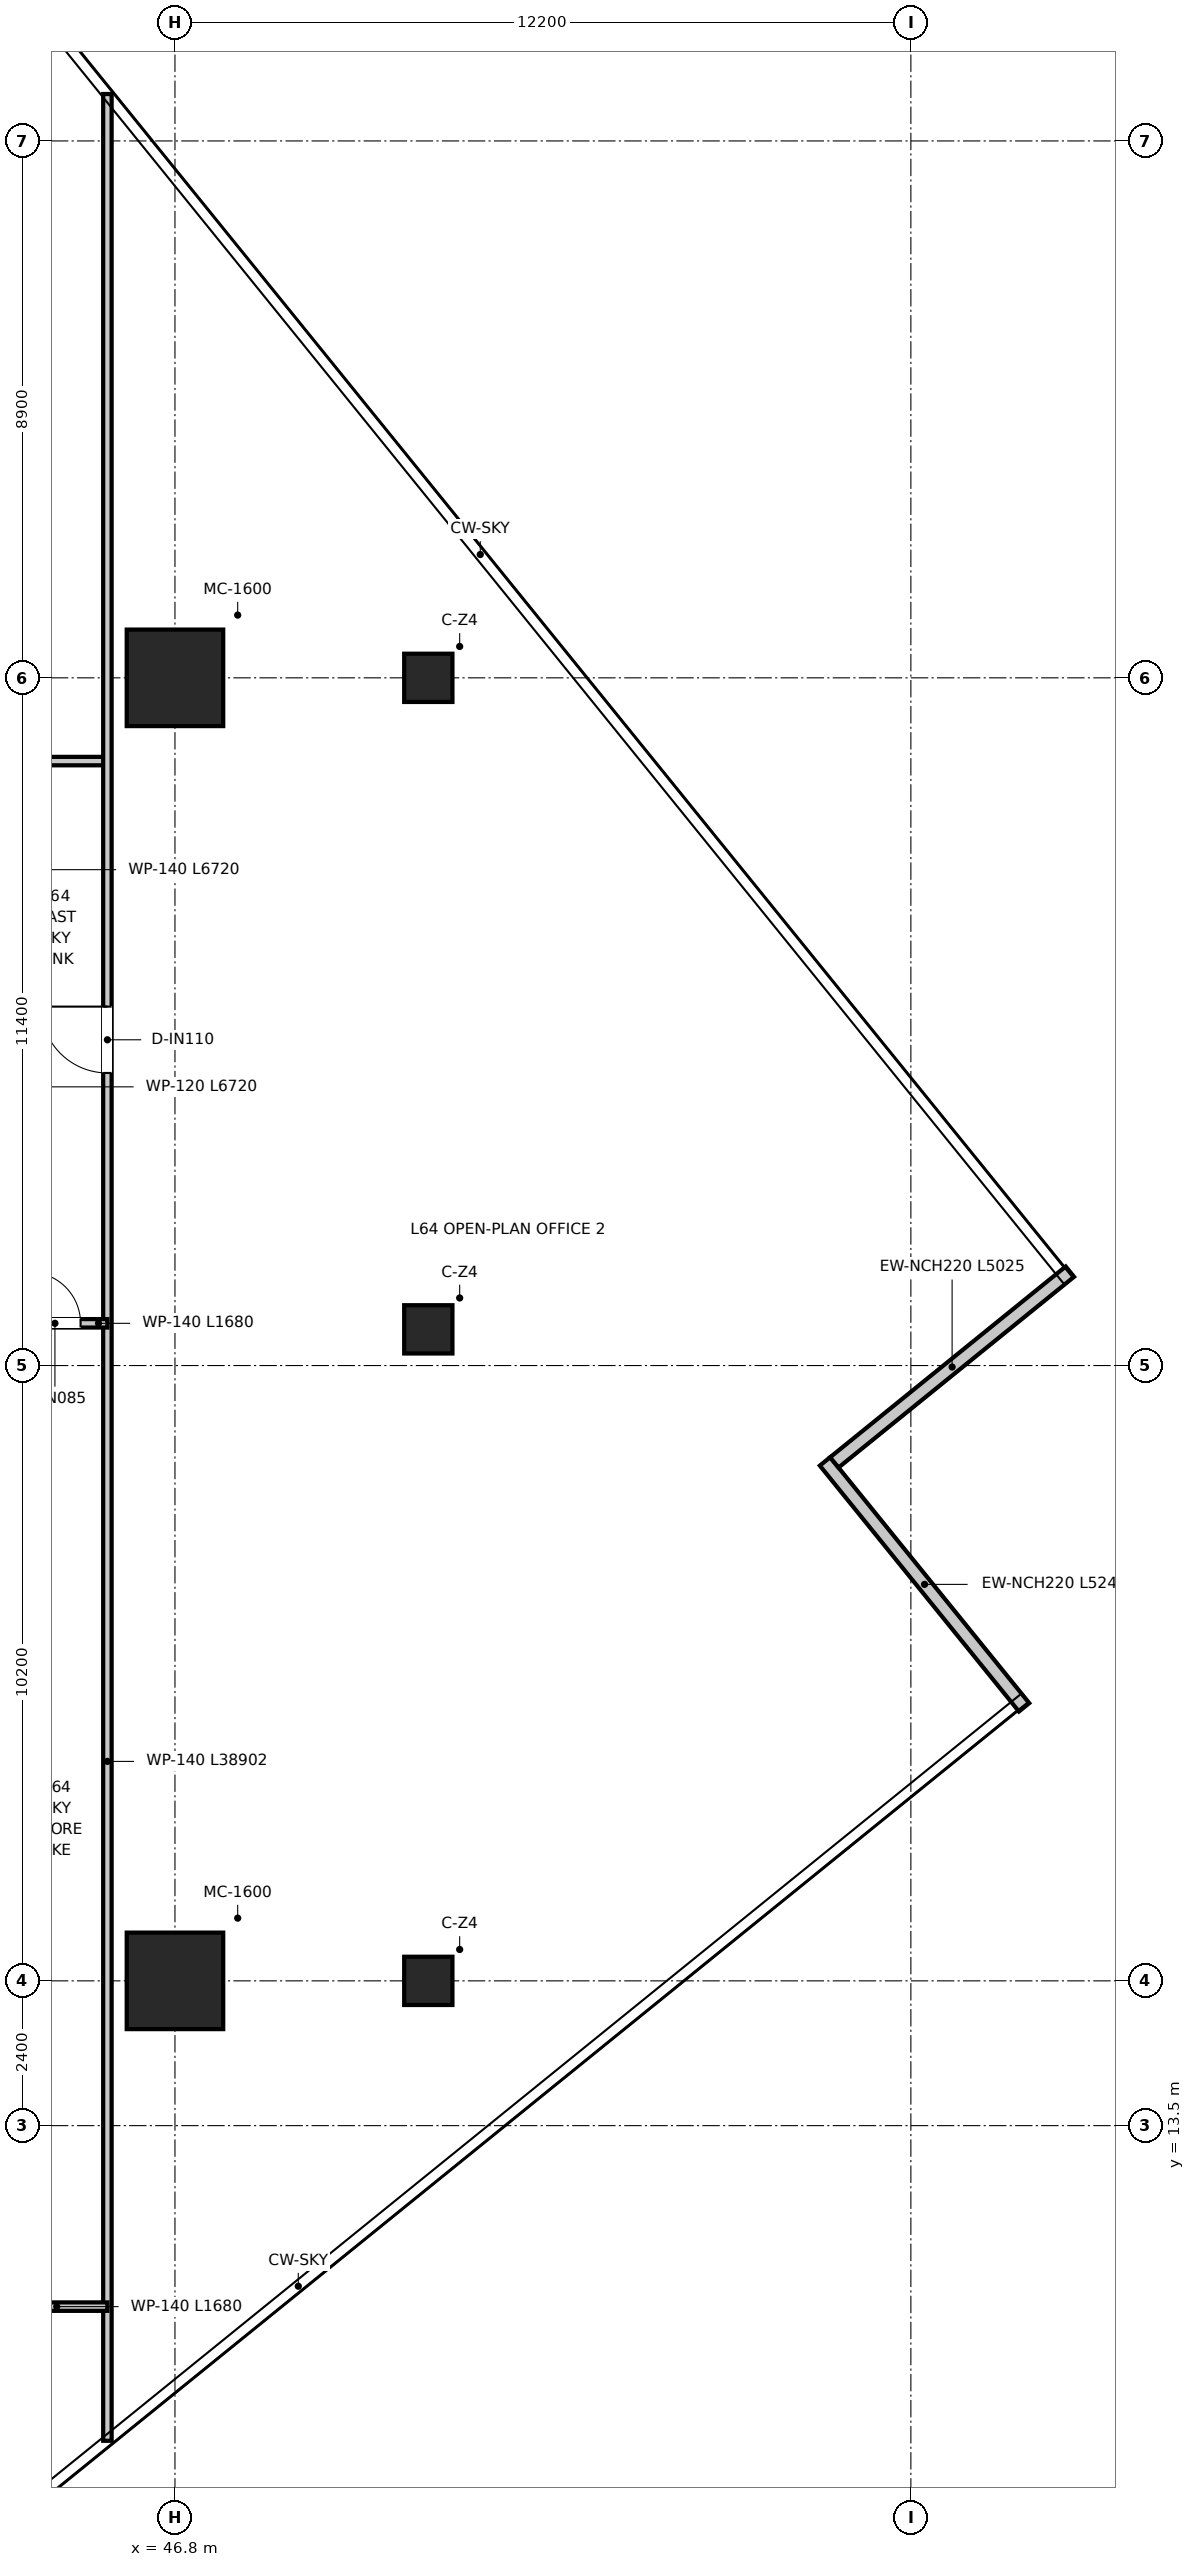
"""IFC4 building model, lengths in metres.
Left out: names, types, materials, properties, quantities, classifications, styles, units other than length and angle.
Written with IfcOpenShell. Run it as: python <this file> out.ifc"""

import sys

from ifc_helpers import new_model, si_unit, direction, frame, frame_2d, origin, origin_2d, place, context, subcontext, project, spatial, rectangle, extrude, source, transform, mapped, element, fill, save


model = new_model("IFC4")
c1 = context("Model", 3, precision=1e-05, world=origin(), true_north=direction((0.0, 1.0)))
c2 = subcontext(c1, "Body", "Model", "MODEL_VIEW")
j1 = project(units=[si_unit("LENGTHUNIT", "METRE"), si_unit("PLANEANGLEUNIT", "RADIAN")], contexts=[c1])
p1 = place(None, origin())
s1 = spatial("IfcSite", under=j1, at=p1, CompositionType="ELEMENT")
p2 = place(p1, origin())
s2 = spatial("IfcBuilding", under=s1, at=p2, CompositionType="ELEMENT")
p3 = place(p2, frame((0.0, 0.0, 262.6)))
s3 = spatial("IfcBuildingStorey", under=s2, at=p3, CompositionType="ELEMENT", Elevation=262.6)
m1 = source(origin(), c2, "Body", "SweptSolid", [
    extrude(rectangle(XDim=1.6, YDim=1.6, at=origin_2d()), origin(), (0.0, 0.0, 1.0), 4.8),
])
for number, where, z_axis, x_axis in (
    (1, (46.8, 15.9, 0.0), (0.0, 0.0, 1.0), (1.0, 0.0, 0.0)),
    (2, (46.8, 37.5, 0.0), (0.0, 0.0, 1.0), (1.0, 0.0, 0.0)),
):
    element("IfcColumn", number, at=place(p3, frame(where, z_axis=z_axis, x_axis=x_axis)), inside=s3, PredefinedType="USERDEFINED", context=c2, shape_type="MappedRepresentation", body=[
        mapped(m1, transform((0.0, 0.0, 0.0), x_axis=(1.0, 0.0, 0.0), y_axis=(0.0, 1.0, 0.0), z_axis=(0.0, 0.0, 1.0), scale=1.0)),
    ])
m2 = source(origin(), c2, "Body", "SweptSolid", [
    extrude(rectangle(XDim=0.8, YDim=0.8, at=origin_2d()), origin(), (0.0, 0.0, 1.0), 4.8),
])
for number, where, z_axis, x_axis in (
    (3, (51.0, 37.5, 0.0), (0.0, 0.0, 1.0), (1.0, 0.0, 0.0)),
    (4, (51.0, 26.7, 0.0), (0.0, 0.0, 1.0), (1.0, 0.0, 0.0)),
    (5, (51.0, 15.9, 0.0), (0.0, 0.0, 1.0), (1.0, 0.0, 0.0)),
):
    element("IfcColumn", number, at=place(p3, frame(where, z_axis=z_axis, x_axis=x_axis)), inside=s3, PredefinedType="COLUMN", context=c2, shape_type="MappedRepresentation", body=[
        mapped(m2, transform((0.0, 0.0, 0.0), x_axis=(1.0, 0.0, 0.0), y_axis=(0.0, 1.0, 0.0), z_axis=(0.0, 0.0, 1.0), scale=1.0)),
    ])
p4 = place(p3, frame((60.877, 20.434, 0.0), z_axis=(0.0, 0.0, 1.0), x_axis=(-0.629344166981, 0.777126707485, 0.0)))
e6 = element("IfcWall", 6, at=p4, inside=s3, PredefinedType="ELEMENTEDWALL", context=c2, shape_type="SweptSolid", body=[
    extrude(rectangle(XDim=5.245, YDim=0.22, at=frame_2d((2.623, 0.0))), origin(), (0.0, 0.0, 1.0), 4.52),
])
p5 = place(p3, frame((57.731, 24.494, 0.0), z_axis=(0.0, 0.0, 1.0), x_axis=(0.777153217978, 0.629311429887, 0.0)))
e7 = element("IfcWall", 7, at=p5, inside=s3, PredefinedType="ELEMENTEDWALL", context=c2, shape_type="SweptSolid", body=[
    extrude(rectangle(XDim=5.025, YDim=0.22, at=frame_2d((2.513, 0.0))), origin(), (0.0, 0.0, 1.0), 4.52),
])
p6 = place(p3, frame((26.32, 36.12, 0.0), z_axis=(0.0, 0.0, 1.0), x_axis=(1.0, 0.0, 0.0)))
e8 = element("IfcWall", 8, at=p6, inside=s3, PredefinedType="PARTITIONING", context=c2, shape_type="SweptSolid", body=[
    extrude(rectangle(XDim=19.36, YDim=0.14, at=frame_2d((9.68, 0.0))), origin(), (0.0, 0.0, 1.0), 4.03),
])
p7 = place(p6, frame((2.49, 0.0, 0.0)))
e9 = element("IfcOpeningElement", 9, at=p7, cuts=e8, PredefinedType="OPENING", context=c2, shape_type="SweptSolid", body=[
    extrude(rectangle(XDim=1.2, YDim=2.15, at=frame_2d((0.6, 1.075))), frame((0.0, 0.08, 0.0), z_axis=(0.0, -1.0, 0.0), x_axis=(1.0, 0.0, 0.0)), (0.0, 0.0, 1.0), 0.16),
])
p8 = place(p6, frame((9.08, 0.0, 0.0)))
e10 = element("IfcOpeningElement", 10, at=p8, cuts=e8, PredefinedType="OPENING", context=c2, shape_type="SweptSolid", body=[
    extrude(rectangle(XDim=1.2, YDim=2.15, at=frame_2d((0.6, 1.075))), frame((0.0, 0.08, 0.0), z_axis=(0.0, -1.0, 0.0), x_axis=(1.0, 0.0, 0.0)), (0.0, 0.0, 1.0), 0.16),
])
p9 = place(p6, frame((15.67, 0.0, 0.0)))
e11 = element("IfcOpeningElement", 11, at=p9, cuts=e8, PredefinedType="OPENING", context=c2, shape_type="SweptSolid", body=[
    extrude(rectangle(XDim=1.2, YDim=2.15, at=frame_2d((0.6, 1.075))), frame((0.0, 0.08, 0.0), z_axis=(0.0, -1.0, 0.0), x_axis=(1.0, 0.0, 0.0)), (0.0, 0.0, 1.0), 0.16),
])
p10 = place(p3, frame((45.68, 8.276, 0.0), z_axis=(0.0, 0.0, 1.0), x_axis=(0.0, 1.0, 0.0)))
e12 = element("IfcWall", 12, at=p10, inside=s3, PredefinedType="PARTITIONING", context=c2, shape_type="SweptSolid", body=[
    extrude(rectangle(XDim=38.902, YDim=0.14, at=frame_2d((19.451, 0.0))), origin(), (0.0, 0.0, 1.0), 3.88),
])
p11 = place(p10, frame((22.674, 0.0, 0.0)))
e13 = element("IfcOpeningElement", 13, at=p11, cuts=e12, PredefinedType="OPENING", context=c2, shape_type="SweptSolid", body=[
    extrude(rectangle(XDim=1.1, YDim=2.15, at=frame_2d((0.55, 1.075))), frame((0.0, 0.08, 0.0), z_axis=(0.0, -1.0, 0.0), x_axis=(1.0, 0.0, 0.0)), (0.0, 0.0, 1.0), 0.16),
])
p12 = place(p3, frame((44.0, 26.8, 0.0), z_axis=(0.0, 0.0, 1.0), x_axis=(1.0, 0.0, 0.0)))
e14 = element("IfcWall", 14, at=p12, inside=s3, PredefinedType="PARTITIONING", context=c2, shape_type="SweptSolid", body=[
    extrude(rectangle(XDim=1.68, YDim=0.14, at=frame_2d((0.84, 0.0))), origin(), (0.0, 0.0, 1.0), 4.03),
])
p13 = place(p12, frame((0.385, 0.0, 0.0)))
e15 = element("IfcOpeningElement", 15, at=p13, cuts=e14, PredefinedType="OPENING", context=c2, shape_type="SweptSolid", body=[
    extrude(rectangle(XDim=0.85, YDim=2.1, at=frame_2d((0.425, 1.05))), frame((0.0, 0.08, 0.0), z_axis=(0.0, -1.0, 0.0), x_axis=(1.0, 0.0, 0.0)), (0.0, 0.0, 1.0), 0.16),
])
p14 = place(p3, frame((44.0, 10.5, 0.0), z_axis=(0.0, 0.0, 1.0), x_axis=(1.0, 0.0, 0.0)))
e16 = element("IfcWall", 16, at=p14, inside=s3, PredefinedType="PARTITIONING", context=c2, shape_type="SweptSolid", body=[
    extrude(rectangle(XDim=1.68, YDim=0.14, at=frame_2d((0.84, 0.0))), origin(), (0.0, 0.0, 1.0), 4.52),
])
p15 = place(p11, origin())
e17 = element("IfcDoor", 17, at=p15, inside=s3, OperationType="SINGLE_SWING_RIGHT", PredefinedType="DOOR", context=c2, shape_type="SweptSolid", body=[
    extrude(rectangle(XDim=1.1, YDim=2.15, at=frame_2d((0.55, 1.075))), frame((0.0, 0.025, 0.0), z_axis=(0.0, -1.0, 0.0), x_axis=(1.0, 0.0, 0.0)), (0.0, 0.0, 1.0), 0.05),
])
fill(e13, e17)
p16 = place(p13, origin())
e18 = element("IfcDoor", 18, at=p16, inside=s3, OperationType="SINGLE_SWING_LEFT", PredefinedType="DOOR", context=c2, shape_type="SweptSolid", body=[
    extrude(rectangle(XDim=0.85, YDim=2.1, at=frame_2d((0.425, 1.05))), frame((0.0, 0.025, 0.0), z_axis=(0.0, -1.0, 0.0), x_axis=(1.0, 0.0, 0.0)), (0.0, 0.0, 1.0), 0.05),
])
fill(e15, e18)
save(model, sys.argv[1])
